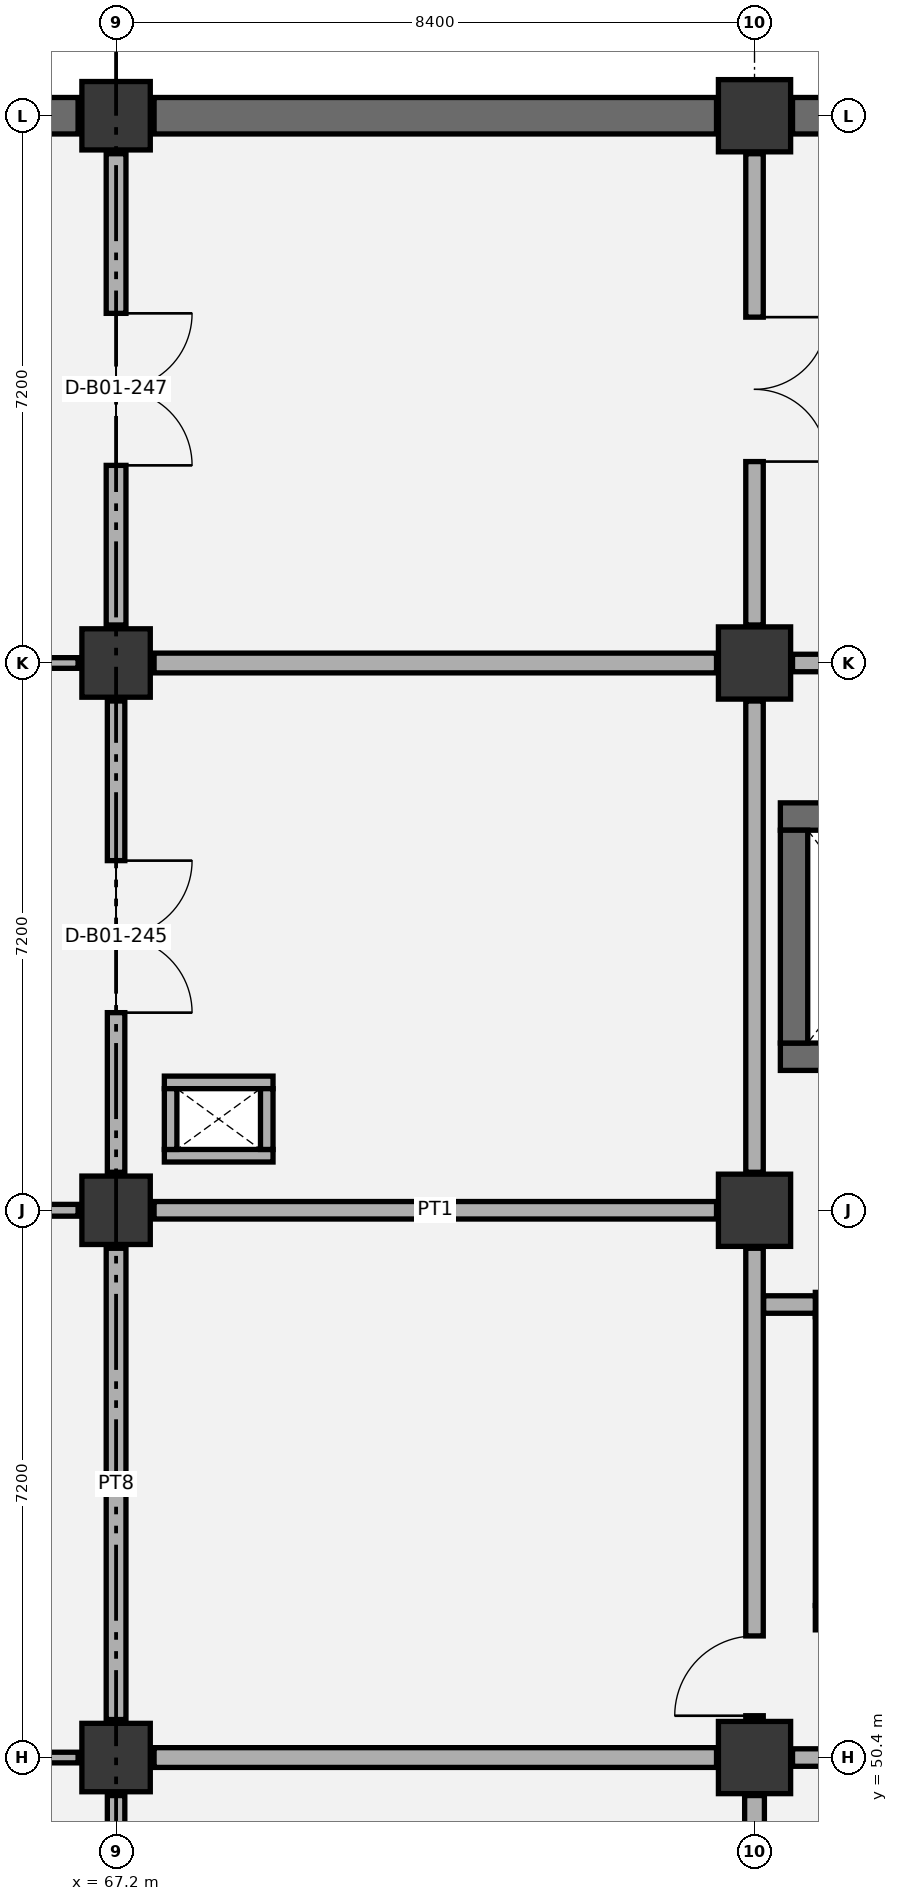
"""IFC4 building model, lengths in metres.
Left out: names, types, materials, properties, quantities, classifications, styles, units other than length and angle.
Written with IfcOpenShell. Run it as: python <this file> out.ifc"""

import sys

from ifc_helpers import new_model, si_unit, direction, frame, frame_2d, origin, origin_2d, place, context, subcontext, project, spatial, rectangle, extrude, element, fill, save


model = new_model("IFC4")
c1 = context("Model", 3, precision=1e-05, world=origin(), true_north=direction((0.0, 1.0)))
c2 = subcontext(c1, "Body", "Model", "MODEL_VIEW")
j1 = project(units=[si_unit("LENGTHUNIT", "METRE"), si_unit("PLANEANGLEUNIT", "RADIAN")], contexts=[c1])
p1 = place(None, origin())
s1 = spatial("IfcSite", under=j1, at=p1, CompositionType="ELEMENT")
p2 = place(p1, origin())
s2 = spatial("IfcBuilding", under=s1, at=p2, CompositionType="ELEMENT")
p3 = place(p2, frame((0.0, 0.0, -4.8)))
s3 = spatial("IfcBuildingStorey", under=s2, at=p3, CompositionType="ELEMENT", Elevation=-4.8)
for number, where, z_axis, x_axis in (
    (1, (67.2, 50.4, 0.0), (0.0, 0.0, 1.0), (1.0, 0.0, 0.0)),
    (2, (67.2, 57.6, 0.0), (0.0, 0.0, 1.0), (1.0, 0.0, 0.0)),
    (3, (67.2, 64.8, 0.0), (0.0, 0.0, 1.0), (1.0, 0.0, 0.0)),
    (4, (67.2, 72.0, 0.0), (0.0, 0.0, 1.0), (1.0, 0.0, 0.0)),
):
    element("IfcColumn", number, at=place(p3, frame(where, z_axis=z_axis, x_axis=x_axis)), inside=s3, PredefinedType="COLUMN", context=c2, shape_type="SweptSolid", body=[
        extrude(rectangle(XDim=0.9, YDim=0.9, at=origin_2d()), origin(), (0.0, 0.0, 1.0), 4.8),
    ])
for number, where, z_axis, x_axis in (
    (5, (75.6, 50.4, 0.0), (0.0, 0.0, 1.0), (1.0, 0.0, 0.0)),
    (6, (75.6, 57.6, 0.0), (0.0, 0.0, 1.0), (1.0, 0.0, 0.0)),
    (7, (75.6, 64.8, 0.0), (0.0, 0.0, 1.0), (1.0, 0.0, 0.0)),
    (8, (75.6, 72.0, 0.0), (0.0, 0.0, 1.0), (1.0, 0.0, 0.0)),
):
    element("IfcColumn", number, at=place(p3, frame(where, z_axis=z_axis, x_axis=x_axis)), inside=s3, PredefinedType="COLUMN", context=c2, shape_type="SweptSolid", body=[
        extrude(rectangle(XDim=0.95, YDim=0.95, at=origin_2d()), origin(), (0.0, 0.0, 1.0), 4.8),
    ])
p4 = place(p3, frame((59.3, 72.0, 0.0), z_axis=(0.0, 0.0, 1.0), x_axis=(1.0, 0.0, 0.0)))
e9 = element("IfcWall", 9, at=p4, inside=s3, PredefinedType="USERDEFINED", context=c2, shape_type="SweptSolid", body=[
    extrude(rectangle(XDim=7.4, YDim=0.48, at=frame_2d((3.7, 0.0))), origin(), (0.0, 0.0, 1.0), 4.45),
])
p5 = place(p3, frame((67.7, 72.0, 0.0), z_axis=(0.0, 0.0, 1.0), x_axis=(1.0, 0.0, 0.0)))
e10 = element("IfcWall", 10, at=p5, inside=s3, PredefinedType="USERDEFINED", context=c2, shape_type="SweptSolid", body=[
    extrude(rectangle(XDim=7.4, YDim=0.48, at=frame_2d((3.7, 0.0))), origin(), (0.0, 0.0, 1.0), 4.45),
])
p6 = place(p3, frame((76.1, 72.0, 0.0), z_axis=(0.0, 0.0, 1.0), x_axis=(1.0, 0.0, 0.0)))
e11 = element("IfcWall", 11, at=p6, inside=s3, PredefinedType="USERDEFINED", context=c2, shape_type="SweptSolid", body=[
    extrude(rectangle(XDim=7.4, YDim=0.48, at=frame_2d((3.7, 0.0))), origin(), (0.0, 0.0, 1.0), 4.45),
])
p7 = place(p3, frame((76.4, 52.24, 0.0), z_axis=(0.0, 0.0, 1.0), x_axis=(1.0, 0.0, 0.0)))
e12 = element("IfcWall", 12, at=p7, inside=s3, PredefinedType="SHEAR", context=c2, shape_type="SweptSolid", body=[
    extrude(rectangle(XDim=7.48, YDim=0.32, at=frame_2d((3.74, 0.0))), origin(), (0.0, 0.0, 1.0), 4.45),
])
p8 = place(p7, frame((0.45, 0.0, 0.0)))
e13 = element("IfcOpeningElement", 13, at=p8, cuts=e12, PredefinedType="OPENING", context=c2, shape_type="SweptSolid", body=[
    extrude(rectangle(XDim=1.05, YDim=2.15, at=frame_2d((0.525, 1.075))), frame((0.0, 0.17, 0.0), z_axis=(0.0, -1.0, 0.0), x_axis=(1.0, 0.0, 0.0)), (0.0, 0.0, 1.0), 0.34),
])
p9 = place(p3, frame((76.4, 56.36, 0.0), z_axis=(0.0, 0.0, 1.0), x_axis=(1.0, 0.0, 0.0)))
e14 = element("IfcWall", 14, at=p9, inside=s3, PredefinedType="SHEAR", context=c2, shape_type="SweptSolid", body=[
    extrude(rectangle(XDim=7.48, YDim=0.32, at=frame_2d((3.74, 0.0))), origin(), (0.0, 0.0, 1.0), 4.45),
])
p10 = place(p3, frame((76.56, 52.4, 0.0), z_axis=(0.0, 0.0, 1.0), x_axis=(0.0, 1.0, 0.0)))
e15 = element("IfcWall", 15, at=p10, inside=s3, PredefinedType="SHEAR", context=c2, shape_type="SweptSolid", body=[
    extrude(rectangle(XDim=3.8, YDim=0.32, at=frame_2d((1.9, 0.0))), origin(), (0.0, 0.0, 1.0), 4.45),
])
p11 = place(p3, frame((75.94, 62.78, 0.0), z_axis=(0.0, 0.0, 1.0), x_axis=(1.0, 0.0, 0.0)))
e16 = element("IfcWall", 16, at=p11, inside=s3, PredefinedType="SHEAR", context=c2, shape_type="SweptSolid", body=[
    extrude(rectangle(XDim=2.87, YDim=0.36, at=frame_2d((1.435, 0.0))), origin(), (0.0, 0.0, 1.0), 4.45),
])
p12 = place(p3, frame((75.94, 59.62, 0.0), z_axis=(0.0, 0.0, 1.0), x_axis=(1.0, 0.0, 0.0)))
e17 = element("IfcWall", 17, at=p12, inside=s3, PredefinedType="SHEAR", context=c2, shape_type="SweptSolid", body=[
    extrude(rectangle(XDim=2.87, YDim=0.36, at=frame_2d((1.435, 0.0))), origin(), (0.0, 0.0, 1.0), 4.45),
])
p13 = place(p12, frame((0.76, 0.0, 0.0)))
e18 = element("IfcOpeningElement", 18, at=p13, cuts=e17, PredefinedType="OPENING", context=c2, shape_type="SweptSolid", body=[
    extrude(rectangle(XDim=1.35, YDim=2.2, at=frame_2d((0.675, 1.1))), frame((0.0, 0.19, 0.0), z_axis=(0.0, -1.0, 0.0), x_axis=(1.0, 0.0, 0.0)), (0.0, 0.0, 1.0), 0.38),
])
p14 = place(p3, frame((76.12, 59.8, 0.0), z_axis=(0.0, 0.0, 1.0), x_axis=(0.0, 1.0, 0.0)))
e19 = element("IfcWall", 19, at=p14, inside=s3, PredefinedType="SHEAR", context=c2, shape_type="SweptSolid", body=[
    extrude(rectangle(XDim=2.8, YDim=0.36, at=frame_2d((1.4, 0.0))), origin(), (0.0, 0.0, 1.0), 4.45),
])
for number, where, z_axis, x_axis in (
    (20, (67.835, 58.317, 0.0), (0.0, 0.0, 1.0), (1.0, 0.0, 0.0)),
    (21, (67.835, 59.282, 0.0), (0.0, 0.0, 1.0), (1.0, 0.0, 0.0)),
):
    element("IfcWall", number, at=place(p3, frame(where, z_axis=z_axis, x_axis=x_axis)), inside=s3, PredefinedType="PARTITIONING", context=c2, shape_type="SweptSolid", body=[
        extrude(rectangle(XDim=1.43, YDim=0.165, at=frame_2d((0.715, 0.0))), origin(), (0.0, 0.0, 1.0), 4.45),
    ])
for number, where, z_axis, x_axis in (
    (22, (67.917, 58.4, 0.0), (0.0, 0.0, 1.0), (0.0, 1.0, 0.0)),
    (23, (69.183, 58.4, 0.0), (0.0, 0.0, 1.0), (0.0, 1.0, 0.0)),
):
    element("IfcWall", number, at=place(p3, frame(where, z_axis=z_axis, x_axis=x_axis)), inside=s3, PredefinedType="PARTITIONING", context=c2, shape_type="SweptSolid", body=[
        extrude(rectangle(XDim=0.8, YDim=0.165, at=frame_2d((0.4, 0.0))), origin(), (0.0, 0.0, 1.0), 4.45),
    ])
p15 = place(p3, frame((67.2, 43.7, 0.0), z_axis=(0.0, 0.0, 1.0), x_axis=(0.0, 1.0, 0.0)))
e24 = element("IfcWall", 24, at=p15, inside=s3, PredefinedType="PARTITIONING", context=c2, shape_type="SweptSolid", body=[
    extrude(rectangle(XDim=6.2, YDim=0.23, at=frame_2d((3.1, 0.0))), origin(), (0.0, 0.0, 1.0), 3.645),
])
p16 = place(p15, frame((2.15, 0.0, 0.0)))
e25 = element("IfcOpeningElement", 25, at=p16, cuts=e24, PredefinedType="OPENING", context=c2, shape_type="SweptSolid", body=[
    extrude(rectangle(XDim=1.9, YDim=2.3, at=frame_2d((0.95, 1.15))), frame((0.0, 0.125, 0.0), z_axis=(0.0, -1.0, 0.0), x_axis=(1.0, 0.0, 0.0)), (0.0, 0.0, 1.0), 0.25),
])
p17 = place(p3, frame((59.3, 50.4, 0.0), z_axis=(0.0, 0.0, 1.0), x_axis=(1.0, 0.0, 0.0)))
e26 = element("IfcWall", 26, at=p17, inside=s3, PredefinedType="PARTITIONING", context=c2, shape_type="SweptSolid", body=[
    extrude(rectangle(XDim=7.4, YDim=0.14, at=frame_2d((3.7, 0.0))), origin(), (0.0, 0.0, 1.0), 3.545),
])
p18 = place(p17, frame((2.9, 0.0, 0.0)))
e27 = element("IfcOpeningElement", 27, at=p18, cuts=e26, PredefinedType="OPENING", context=c2, shape_type="SweptSolid", body=[
    extrude(rectangle(XDim=1.6, YDim=2.2, at=frame_2d((0.8, 1.1))), frame((0.0, 0.08, 0.0), z_axis=(0.0, -1.0, 0.0), x_axis=(1.0, 0.0, 0.0)), (0.0, 0.0, 1.0), 0.16),
])
p19 = place(p3, frame((67.2, 50.9, 0.0), z_axis=(0.0, 0.0, 1.0), x_axis=(0.0, 1.0, 0.0)))
e28 = element("IfcWall", 28, at=p19, inside=s3, PredefinedType="PARTITIONING", context=c2, shape_type="SweptSolid", body=[
    extrude(rectangle(XDim=6.2, YDim=0.26, at=frame_2d((3.1, 0.0))), origin(), (0.0, 0.0, 1.0), 3.645),
])
p20 = place(p3, frame((59.3, 57.6, 0.0), z_axis=(0.0, 0.0, 1.0), x_axis=(1.0, 0.0, 0.0)))
e29 = element("IfcWall", 29, at=p20, inside=s3, PredefinedType="PARTITIONING", context=c2, shape_type="SweptSolid", body=[
    extrude(rectangle(XDim=7.4, YDim=0.155, at=frame_2d((3.7, 0.0))), origin(), (0.0, 0.0, 1.0), 3.545),
])
p21 = place(p20, frame((2.8, 0.0, 0.0)))
e30 = element("IfcOpeningElement", 30, at=p21, cuts=e29, PredefinedType="OPENING", context=c2, shape_type="SweptSolid", body=[
    extrude(rectangle(XDim=1.8, YDim=2.25, at=frame_2d((0.9, 1.125))), frame((0.0, 0.087, 0.0), z_axis=(0.0, -1.0, 0.0), x_axis=(1.0, 0.0, 0.0)), (0.0, 0.0, 1.0), 0.175),
])
p22 = place(p3, frame((67.2, 58.1, 0.0), z_axis=(0.0, 0.0, 1.0), x_axis=(0.0, 1.0, 0.0)))
e31 = element("IfcWall", 31, at=p22, inside=s3, PredefinedType="PARTITIONING", context=c2, shape_type="SweptSolid", body=[
    extrude(rectangle(XDim=6.2, YDim=0.23, at=frame_2d((3.1, 0.0))), origin(), (0.0, 0.0, 1.0), 3.645),
])
p23 = place(p22, frame((2.1, 0.0, 0.0)))
e32 = element("IfcOpeningElement", 32, at=p23, cuts=e31, PredefinedType="OPENING", context=c2, shape_type="SweptSolid", body=[
    extrude(rectangle(XDim=2.0, YDim=2.35, at=frame_2d((1.0, 1.175))), frame((0.0, 0.125, 0.0), z_axis=(0.0, -1.0, 0.0), x_axis=(1.0, 0.0, 0.0)), (0.0, 0.0, 1.0), 0.25),
])
p24 = place(p3, frame((59.3, 64.8, 0.0), z_axis=(0.0, 0.0, 1.0), x_axis=(1.0, 0.0, 0.0)))
e33 = element("IfcWall", 33, at=p24, inside=s3, PredefinedType="PARTITIONING", context=c2, shape_type="SweptSolid", body=[
    extrude(rectangle(XDim=7.4, YDim=0.14, at=frame_2d((3.7, 0.0))), origin(), (0.0, 0.0, 1.0), 3.545),
])
p25 = place(p24, frame((2.8, 0.0, 0.0)))
e34 = element("IfcOpeningElement", 34, at=p25, cuts=e33, PredefinedType="OPENING", context=c2, shape_type="SweptSolid", body=[
    extrude(rectangle(XDim=1.8, YDim=2.25, at=frame_2d((0.9, 1.125))), frame((0.0, 0.08, 0.0), z_axis=(0.0, -1.0, 0.0), x_axis=(1.0, 0.0, 0.0)), (0.0, 0.0, 1.0), 0.16),
])
p26 = place(p3, frame((67.2, 65.3, 0.0), z_axis=(0.0, 0.0, 1.0), x_axis=(0.0, 1.0, 0.0)))
e35 = element("IfcWall", 35, at=p26, inside=s3, PredefinedType="PARTITIONING", context=c2, shape_type="SweptSolid", body=[
    extrude(rectangle(XDim=6.2, YDim=0.26, at=frame_2d((3.1, 0.0))), origin(), (0.0, 0.0, 1.0), 3.645),
])
p27 = place(p26, frame((2.1, 0.0, 0.0)))
e36 = element("IfcOpeningElement", 36, at=p27, cuts=e35, PredefinedType="OPENING", context=c2, shape_type="SweptSolid", body=[
    extrude(rectangle(XDim=2.0, YDim=2.35, at=frame_2d((1.0, 1.175))), frame((0.0, 0.14, 0.0), z_axis=(0.0, -1.0, 0.0), x_axis=(1.0, 0.0, 0.0)), (0.0, 0.0, 1.0), 0.28),
])
p28 = place(p3, frame((75.6, 43.7, 0.0), z_axis=(0.0, 0.0, 1.0), x_axis=(0.0, 1.0, 0.0)))
e37 = element("IfcWall", 37, at=p28, inside=s3, PredefinedType="PARTITIONING", context=c2, shape_type="SweptSolid", body=[
    extrude(rectangle(XDim=6.2, YDim=0.26, at=frame_2d((3.1, 0.0))), origin(), (0.0, 0.0, 1.0), 3.645),
])
p29 = place(p28, frame((2.15, 0.0, 0.0)))
e38 = element("IfcOpeningElement", 38, at=p29, cuts=e37, PredefinedType="OPENING", context=c2, shape_type="SweptSolid", body=[
    extrude(rectangle(XDim=1.9, YDim=2.3, at=frame_2d((0.95, 1.15))), frame((0.0, 0.14, 0.0), z_axis=(0.0, -1.0, 0.0), x_axis=(1.0, 0.0, 0.0)), (0.0, 0.0, 1.0), 0.28),
])
p30 = place(p3, frame((67.7, 50.4, 0.0), z_axis=(0.0, 0.0, 1.0), x_axis=(1.0, 0.0, 0.0)))
e39 = element("IfcWall", 39, at=p30, inside=s3, PredefinedType="PARTITIONING", context=c2, shape_type="SweptSolid", body=[
    extrude(rectangle(XDim=7.4, YDim=0.26, at=frame_2d((3.7, 0.0))), origin(), (0.0, 0.0, 1.0), 3.545),
])
p31 = place(p3, frame((75.6, 50.9, 0.0), z_axis=(0.0, 0.0, 1.0), x_axis=(0.0, 1.0, 0.0)))
e40 = element("IfcWall", 40, at=p31, inside=s3, PredefinedType="PARTITIONING", context=c2, shape_type="SweptSolid", body=[
    extrude(rectangle(XDim=6.2, YDim=0.23, at=frame_2d((3.1, 0.0))), origin(), (0.0, 0.0, 1.0), 3.645),
])
p32 = place(p31, frame((0.05, 0.0, 0.0)))
e41 = element("IfcOpeningElement", 41, at=p32, cuts=e40, PredefinedType="OPENING", context=c2, shape_type="SweptSolid", body=[
    extrude(rectangle(XDim=1.05, YDim=2.15, at=frame_2d((0.525, 1.075))), frame((0.0, 0.125, 0.0), z_axis=(0.0, -1.0, 0.0), x_axis=(1.0, 0.0, 0.0)), (0.0, 0.0, 1.0), 0.25),
])
p33 = place(p3, frame((67.7, 57.6, 0.0), z_axis=(0.0, 0.0, 1.0), x_axis=(1.0, 0.0, 0.0)))
e42 = element("IfcWall", 42, at=p33, inside=s3, PredefinedType="PARTITIONING", context=c2, shape_type="SweptSolid", body=[
    extrude(rectangle(XDim=7.4, YDim=0.23, at=frame_2d((3.7, 0.0))), origin(), (0.0, 0.0, 1.0), 3.545),
])
p34 = place(p3, frame((75.6, 58.1, 0.0), z_axis=(0.0, 0.0, 1.0), x_axis=(0.0, 1.0, 0.0)))
e43 = element("IfcWall", 43, at=p34, inside=s3, PredefinedType="PARTITIONING", context=c2, shape_type="SweptSolid", body=[
    extrude(rectangle(XDim=6.2, YDim=0.23, at=frame_2d((3.1, 0.0))), origin(), (0.0, 0.0, 1.0), 3.645),
])
p35 = place(p3, frame((67.7, 64.8, 0.0), z_axis=(0.0, 0.0, 1.0), x_axis=(1.0, 0.0, 0.0)))
e44 = element("IfcWall", 44, at=p35, inside=s3, PredefinedType="PARTITIONING", context=c2, shape_type="SweptSolid", body=[
    extrude(rectangle(XDim=7.4, YDim=0.26, at=frame_2d((3.7, 0.0))), origin(), (0.0, 0.0, 1.0), 3.545),
])
p36 = place(p3, frame((75.6, 65.3, 0.0), z_axis=(0.0, 0.0, 1.0), x_axis=(0.0, 1.0, 0.0)))
e45 = element("IfcWall", 45, at=p36, inside=s3, PredefinedType="PARTITIONING", context=c2, shape_type="SweptSolid", body=[
    extrude(rectangle(XDim=6.2, YDim=0.23, at=frame_2d((3.1, 0.0))), origin(), (0.0, 0.0, 1.0), 3.645),
])
p37 = place(p36, frame((2.15, 0.0, 0.0)))
e46 = element("IfcOpeningElement", 46, at=p37, cuts=e45, PredefinedType="OPENING", context=c2, shape_type="SweptSolid", body=[
    extrude(rectangle(XDim=1.9, YDim=2.3, at=frame_2d((0.95, 1.15))), frame((0.0, 0.125, 0.0), z_axis=(0.0, -1.0, 0.0), x_axis=(1.0, 0.0, 0.0)), (0.0, 0.0, 1.0), 0.25),
])
p38 = place(p3, frame((76.1, 50.4, 0.0), z_axis=(0.0, 0.0, 1.0), x_axis=(1.0, 0.0, 0.0)))
e47 = element("IfcWall", 47, at=p38, inside=s3, PredefinedType="PARTITIONING", context=c2, shape_type="SweptSolid", body=[
    extrude(rectangle(XDim=7.4, YDim=0.23, at=frame_2d((3.7, 0.0))), origin(), (0.0, 0.0, 1.0), 3.545),
])
p39 = place(p38, frame((2.95, 0.0, 0.0)))
e48 = element("IfcOpeningElement", 48, at=p39, cuts=e47, PredefinedType="OPENING", context=c2, shape_type="SweptSolid", body=[
    extrude(rectangle(XDim=1.5, YDim=2.15, at=frame_2d((0.75, 1.075))), frame((0.0, 0.125, 0.0), z_axis=(0.0, -1.0, 0.0), x_axis=(1.0, 0.0, 0.0)), (0.0, 0.0, 1.0), 0.25),
])
p40 = place(p3, frame((75.72, 56.36, 0.0), z_axis=(0.0, 0.0, 1.0), x_axis=(1.0, 0.0, 0.0)))
e49 = element("IfcWall", 49, at=p40, inside=s3, PredefinedType="PARTITIONING", context=c2, shape_type="SweptSolid", body=[
    extrude(rectangle(XDim=0.68, YDim=0.23, at=frame_2d((0.34, 0.0))), origin(), (0.0, 0.0, 1.0), 4.45),
])
p41 = place(p3, frame((76.1, 64.8, 0.0), z_axis=(0.0, 0.0, 1.0), x_axis=(1.0, 0.0, 0.0)))
e50 = element("IfcWall", 50, at=p41, inside=s3, PredefinedType="PARTITIONING", context=c2, shape_type="SweptSolid", body=[
    extrude(rectangle(XDim=7.4, YDim=0.23, at=frame_2d((3.7, 0.0))), origin(), (0.0, 0.0, 1.0), 3.545),
])
p42 = place(p23, frame((2.0, 0.0, 0.0), z_axis=(0.0, 0.0, 1.0), x_axis=(-1.0, 0.0, 0.0)))
e51 = element("IfcDoor", 51, at=p42, inside=s3, OperationType="DOUBLE_DOOR_SINGLE_SWING", PredefinedType="DOOR", context=c2, shape_type="SweptSolid", body=[
    extrude(rectangle(XDim=2.0, YDim=2.35, at=frame_2d((1.0, 1.175))), frame((0.0, 0.025, 0.0), z_axis=(0.0, -1.0, 0.0), x_axis=(1.0, 0.0, 0.0)), (0.0, 0.0, 1.0), 0.05),
])
fill(e32, e51)
p43 = place(p27, frame((2.0, 0.0, 0.0), z_axis=(0.0, 0.0, 1.0), x_axis=(-1.0, 0.0, 0.0)))
e52 = element("IfcDoor", 52, at=p43, inside=s3, OperationType="DOUBLE_DOOR_SINGLE_SWING", PredefinedType="DOOR", context=c2, shape_type="SweptSolid", body=[
    extrude(rectangle(XDim=2.0, YDim=2.35, at=frame_2d((1.0, 1.175))), frame((0.0, 0.025, 0.0), z_axis=(0.0, -1.0, 0.0), x_axis=(1.0, 0.0, 0.0)), (0.0, 0.0, 1.0), 0.05),
])
fill(e36, e52)
p44 = place(p32, origin())
e53 = element("IfcDoor", 53, at=p44, inside=s3, OperationType="SINGLE_SWING_LEFT", PredefinedType="DOOR", context=c2, shape_type="SweptSolid", body=[
    extrude(rectangle(XDim=1.05, YDim=2.15, at=frame_2d((0.525, 1.075))), frame((0.0, 0.025, 0.0), z_axis=(0.0, -1.0, 0.0), x_axis=(1.0, 0.0, 0.0)), (0.0, 0.0, 1.0), 0.05),
])
fill(e41, e53)
p45 = place(p37, frame((1.9, 0.0, 0.0), z_axis=(0.0, 0.0, 1.0), x_axis=(-1.0, 0.0, 0.0)))
e54 = element("IfcDoor", 54, at=p45, inside=s3, OperationType="DOUBLE_DOOR_SINGLE_SWING", PredefinedType="DOOR", context=c2, shape_type="SweptSolid", body=[
    extrude(rectangle(XDim=1.9, YDim=2.3, at=frame_2d((0.95, 1.15))), frame((0.0, 0.025, 0.0), z_axis=(0.0, -1.0, 0.0), x_axis=(1.0, 0.0, 0.0)), (0.0, 0.0, 1.0), 0.05),
])
fill(e46, e54)
save(model, sys.argv[1])
